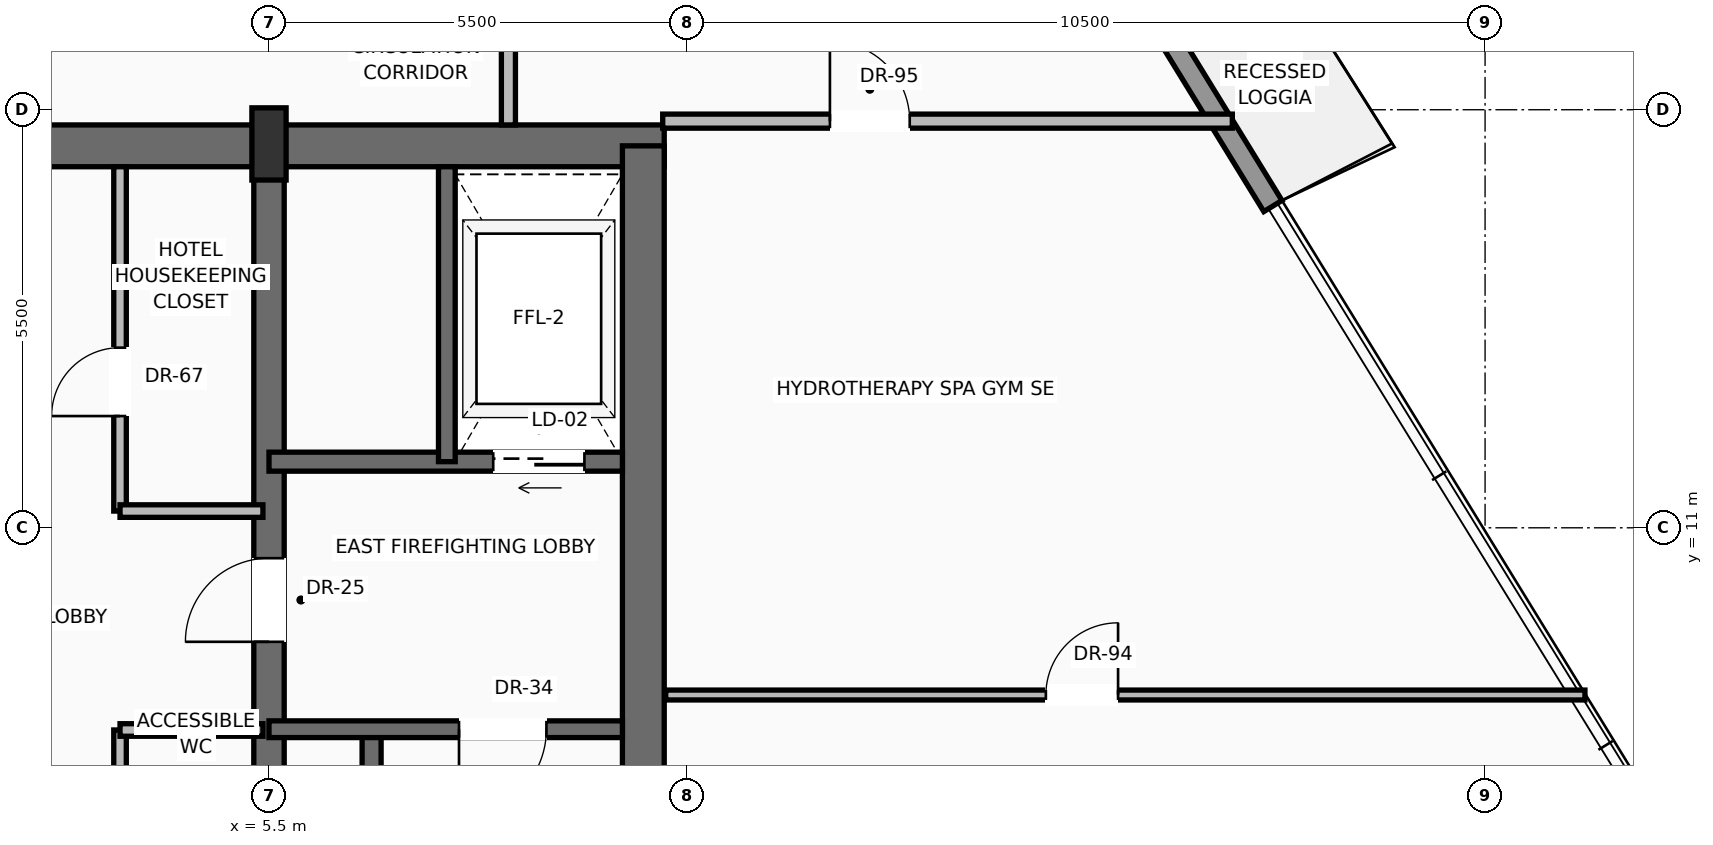
"""IFC4 building model, lengths in metres.
Left out: names, types, materials, properties, quantities, classifications, styles, units other than length and angle.
Written with IfcOpenShell. Run it as: python <this file> out.ifc"""

import sys

from ifc_helpers import new_model, si_unit, direction, frame, frame_2d, origin, origin_2d, place, context, subcontext, project, spatial, rectangle, extrude, source, transform, mapped, element, fill, save


model = new_model("IFC4")
c1 = context("Model", 3, precision=1e-05, world=origin(), true_north=direction((0.0, 1.0)))
c2 = subcontext(c1, "Body", "Model", "MODEL_VIEW")
j1 = project(units=[si_unit("LENGTHUNIT", "METRE"), si_unit("PLANEANGLEUNIT", "RADIAN")], contexts=[c1])
p1 = place(None, origin())
s1 = spatial("IfcSite", under=j1, at=p1, CompositionType="ELEMENT")
p2 = place(p1, origin())
s2 = spatial("IfcBuilding", under=s1, at=p2, CompositionType="ELEMENT")
p3 = place(p2, frame((0.0, 0.0, 244.15)))
s3 = spatial("IfcBuildingStorey", under=s2, at=p3, CompositionType="ELEMENT", Elevation=244.15)
p4 = place(p3, frame((-10.7, 16.025, 0.0), z_axis=(0.0, 0.0, 1.0), x_axis=(1.0, 0.0, 0.0)))
e1 = element("IfcWall", 1, at=p4, inside=s3, PredefinedType="SHEAR", context=c2, shape_type="SweptSolid", body=[
    extrude(rectangle(XDim=21.4, YDim=0.55, at=frame_2d((10.7, 0.0))), origin(), (0.0, 0.0, 1.0), 3.24),
])
p5 = place(p4, frame((3.27, 0.0, 0.0)))
e2 = element("IfcOpeningElement", 2, at=p5, cuts=e1, PredefinedType="OPENING", context=c2, shape_type="SweptSolid", body=[
    extrude(rectangle(XDim=1.3, YDim=2.3, at=frame_2d((0.65, 1.15))), frame((0.0, 0.285, 0.0), z_axis=(0.0, -1.0, 0.0), x_axis=(1.0, 0.0, 0.0)), (0.0, 0.0, 1.0), 0.57),
])
p6 = place(p4, frame((9.7, 0.0, 0.0)))
e3 = element("IfcOpeningElement", 3, at=p6, cuts=e1, PredefinedType="OPENING", context=c2, shape_type="SweptSolid", body=[
    extrude(rectangle(XDim=2.0, YDim=2.4, at=frame_2d((1.0, 1.2))), frame((0.0, 0.285, 0.0), z_axis=(0.0, -1.0, 0.0), x_axis=(1.0, 0.0, 0.0)), (0.0, 0.0, 1.0), 0.57),
])
p7 = place(p3, frame((10.425, 0.575, 0.0), z_axis=(0.0, 0.0, 1.0), x_axis=(0.0, 1.0, 0.0)))
e4 = element("IfcWall", 4, at=p7, inside=s3, PredefinedType="SHEAR", context=c2, shape_type="SweptSolid", body=[
    extrude(rectangle(XDim=15.45, YDim=0.55, at=frame_2d((7.725, 0.0))), origin(), (0.0, 0.0, 1.0), 3.24),
])
p8 = place(p3, frame((5.5, 0.575, 0.0), z_axis=(0.0, 0.0, 1.0), x_axis=(0.0, 1.0, 0.0)))
e5 = element("IfcWall", 5, at=p8, inside=s3, PredefinedType="SHEAR", context=c2, shape_type="SweptSolid", body=[
    extrude(rectangle(XDim=15.45, YDim=0.4, at=frame_2d((7.725, 0.0))), origin(), (0.0, 0.0, 1.0), 3.24),
])
p9 = place(p8, frame((8.925, 0.0, 0.0)))
e6 = element("IfcOpeningElement", 6, at=p9, cuts=e5, PredefinedType="OPENING", context=c2, shape_type="SweptSolid", body=[
    extrude(rectangle(XDim=1.1, YDim=2.2, at=frame_2d((0.55, 1.1))), frame((0.0, 0.21, 0.0), z_axis=(0.0, -1.0, 0.0), x_axis=(1.0, 0.0, 0.0)), (0.0, 0.0, 1.0), 0.42),
])
m1 = source(origin(), c2, "Body", "SweptSolid", [
    extrude(rectangle(XDim=0.45, YDim=0.95, at=origin_2d()), origin(), (0.0, 0.0, 1.0), 3.45),
])
p10 = place(p3, frame((5.5, 16.05, 0.0), z_axis=(0.0, 0.0, 1.0), x_axis=(1.0, 0.0, 0.0)))
e7 = element("IfcColumn", 7, at=p10, inside=s3, PredefinedType="PILASTER", context=c2, shape_type="MappedRepresentation", body=[
    mapped(m1, transform((0.0, 0.0, 0.0), scale=1.0)),
])
p11 = place(p3, frame((8.394, 32.017, 0.0), z_axis=(0.0, 0.0, 1.0), x_axis=(0.523559364354, -0.851989197113, 0.0)))
e8 = element("IfcWall", 8, at=p11, inside=s3, PredefinedType="SOLIDWALL", context=c2, shape_type="SweptSolid", body=[
    extrude(rectangle(XDim=19.7, YDim=0.28, at=frame_2d((9.85, 0.0))), origin(), (0.0, 0.0, 1.0), 2.82),
])
p12 = place(p11, frame((4.728, 0.0, 0.0)))
e9 = element("IfcOpeningElement", 9, at=p12, cuts=e8, PredefinedType="OPENING", context=c2, shape_type="SweptSolid", body=[
    extrude(rectangle(XDim=1.6, YDim=2.35, at=frame_2d((0.8, 1.175))), frame((0.0, 0.15, 0.0), z_axis=(0.0, -1.0, 0.0), x_axis=(1.0, 0.0, 0.0)), (0.0, 0.0, 1.0), 0.3),
])
p13 = place(p11, frame((13.396, 0.0, 0.9)))
e10 = element("IfcOpeningElement", 10, at=p13, cuts=e8, PredefinedType="OPENING", context=c2, shape_type="SweptSolid", body=[
    extrude(rectangle(XDim=1.55, YDim=1.75, at=frame_2d((0.775, 0.875))), frame((0.0, 0.15, 0.0), z_axis=(0.0, -1.0, 0.0), x_axis=(1.0, 0.0, 0.0)), (0.0, 0.0, 1.0), 0.3),
])
p14 = place(p3, frame((6.85, 0.85, 0.0), z_axis=(0.0, 0.0, 1.0), x_axis=(0.0, 1.0, 0.0)))
e11 = element("IfcWall", 11, at=p14, inside=s3, PredefinedType="SOLIDWALL", context=c2, shape_type="SweptSolid", body=[
    extrude(rectangle(XDim=7.5, YDim=0.25, at=frame_2d((3.75, 0.0))), origin(), (0.0, 0.0, 1.0), 3.24),
])
p15 = place(p3, frame((10.15, 8.35, 0.0), z_axis=(0.0, 0.0, 1.0), x_axis=(-1.0, 0.0, 0.0)))
e12 = element("IfcWall", 12, at=p15, inside=s3, PredefinedType="SOLIDWALL", context=c2, shape_type="SweptSolid", body=[
    extrude(rectangle(XDim=4.65, YDim=0.22, at=frame_2d((2.325, 0.0))), origin(), (0.0, 0.0, 1.0), 3.24),
])
p16 = place(p15, frame((1.0, 0.0, 0.0)))
e13 = element("IfcOpeningElement", 13, at=p16, cuts=e12, PredefinedType="OPENING", context=c2, shape_type="SweptSolid", body=[
    extrude(rectangle(XDim=1.15, YDim=2.2, at=frame_2d((0.575, 1.1))), frame((0.0, 0.12, 0.0), z_axis=(0.0, -1.0, 0.0), x_axis=(1.0, 0.0, 0.0)), (0.0, 0.0, 1.0), 0.24),
])
p17 = place(p3, frame((10.15, 11.87, 0.0), z_axis=(0.0, 0.0, 1.0), x_axis=(-1.0, 0.0, 0.0)))
e14 = element("IfcWall", 14, at=p17, inside=s3, PredefinedType="SOLIDWALL", context=c2, shape_type="SweptSolid", body=[
    extrude(rectangle(XDim=4.65, YDim=0.25, at=frame_2d((2.325, 0.0))), origin(), (0.0, 0.0, 1.0), 3.24),
])
p18 = place(p17, frame((0.5, 0.0, 0.0)))
e15 = element("IfcOpeningElement", 15, at=p18, cuts=e14, PredefinedType="OPENING", context=c2, shape_type="SweptSolid", body=[
    extrude(rectangle(XDim=1.2, YDim=2.25, at=frame_2d((0.6, 1.125))), frame((0.0, 0.135, 0.0), z_axis=(0.0, -1.0, 0.0), x_axis=(1.0, 0.0, 0.0)), (0.0, 0.0, 1.0), 0.27),
])
p19 = place(p3, frame((7.84, 11.87, 0.0), z_axis=(0.0, 0.0, 1.0), x_axis=(0.0, 1.0, 0.0)))
e16 = element("IfcWall", 16, at=p19, inside=s3, PredefinedType="SOLIDWALL", context=c2, shape_type="SweptSolid", body=[
    extrude(rectangle(XDim=3.88, YDim=0.22, at=frame_2d((1.94, 0.0))), origin(), (0.0, 0.0, 1.0), 3.24),
])
p20 = place(p3, frame((3.54, 6.0, 0.0), z_axis=(0.0, 0.0, 1.0), x_axis=(0.0, 1.0, 0.0)))
e17 = element("IfcWall", 17, at=p20, inside=s3, PredefinedType="PARTITIONING", context=c2, shape_type="SweptSolid", body=[
    extrude(rectangle(XDim=2.34, YDim=0.165, at=frame_2d((1.17, 0.0))), origin(), (0.0, 0.0, 1.0), 3.232),
])
p21 = place(p20, frame((0.72, 0.0, 0.0)))
e18 = element("IfcOpeningElement", 18, at=p21, cuts=e17, PredefinedType="OPENING", context=c2, shape_type="SweptSolid", body=[
    extrude(rectangle(XDim=0.9, YDim=2.1, at=frame_2d((0.45, 1.05))), frame((0.0, 0.093, 0.0), z_axis=(0.0, -1.0, 0.0), x_axis=(1.0, 0.0, 0.0)), (0.0, 0.0, 1.0), 0.185),
])
p22 = place(p3, frame((3.54, 8.34, 0.0), z_axis=(0.0, 0.0, 1.0), x_axis=(1.0, 0.0, 0.0)))
e19 = element("IfcWall", 19, at=p22, inside=s3, PredefinedType="PARTITIONING", context=c2, shape_type="SweptSolid", body=[
    extrude(rectangle(XDim=1.88, YDim=0.165, at=frame_2d((0.94, 0.0))), origin(), (0.0, 0.0, 1.0), 3.232),
])
p23 = place(p3, frame((3.54, 11.22, 0.0), z_axis=(0.0, 0.0, 1.0), x_axis=(0.0, 1.0, 0.0)))
e20 = element("IfcWall", 20, at=p23, inside=s3, PredefinedType="PARTITIONING", context=c2, shape_type="SweptSolid", body=[
    extrude(rectangle(XDim=4.53, YDim=0.165, at=frame_2d((2.265, 0.0))), origin(), (0.0, 0.0, 1.0), 3.232),
])
p24 = place(p23, frame((1.25, 0.0, 0.0)))
e21 = element("IfcOpeningElement", 21, at=p24, cuts=e20, PredefinedType="OPENING", context=c2, shape_type="SweptSolid", body=[
    extrude(rectangle(XDim=0.9, YDim=2.1, at=frame_2d((0.45, 1.05))), frame((0.0, 0.093, 0.0), z_axis=(0.0, -1.0, 0.0), x_axis=(1.0, 0.0, 0.0)), (0.0, 0.0, 1.0), 0.185),
])
p25 = place(p3, frame((3.54, 11.22, 0.0), z_axis=(0.0, 0.0, 1.0), x_axis=(1.0, 0.0, 0.0)))
e22 = element("IfcWall", 22, at=p25, inside=s3, PredefinedType="PARTITIONING", context=c2, shape_type="SweptSolid", body=[
    extrude(rectangle(XDim=1.88, YDim=0.165, at=frame_2d((0.94, 0.0))), origin(), (0.0, 0.0, 1.0), 3.232),
])
p26 = place(p3, frame((8.65, 16.3, 0.0), z_axis=(0.0, 0.0, 1.0), x_axis=(0.0, 1.0, 0.0)))
e23 = element("IfcWall", 23, at=p26, inside=s3, PredefinedType="PARTITIONING", context=c2, shape_type="SweptSolid", body=[
    extrude(rectangle(XDim=13.9, YDim=0.185, at=frame_2d((6.95, 0.0))), origin(), (0.0, 0.0, 1.0), 3.232),
])
p27 = place(p26, frame((3.144, 0.0, 0.0)))
e24 = element("IfcOpeningElement", 24, at=p27, cuts=e23, PredefinedType="OPENING", context=c2, shape_type="SweptSolid", body=[
    extrude(rectangle(XDim=1.05, YDim=2.25, at=frame_2d((0.525, 1.125))), frame((0.0, 0.103, 0.0), z_axis=(0.0, -1.0, 0.0), x_axis=(1.0, 0.0, 0.0)), (0.0, 0.0, 1.0), 0.205),
])
p28 = place(p3, frame((10.68, 16.35, 0.0), z_axis=(0.0, 0.0, 1.0), x_axis=(1.0, 0.0, 0.0)))
e25 = element("IfcWall", 25, at=p28, inside=s3, PredefinedType="PARTITIONING", context=c2, shape_type="SweptSolid", body=[
    extrude(rectangle(XDim=7.495, YDim=0.185, at=frame_2d((3.747, 0.0))), origin(), (0.0, 0.0, 1.0), 3.232),
])
p29 = place(p28, frame((2.2, 0.0, 0.0)))
e26 = element("IfcOpeningElement", 26, at=p29, cuts=e25, PredefinedType="OPENING", context=c2, shape_type="SweptSolid", body=[
    extrude(rectangle(XDim=1.05, YDim=2.25, at=frame_2d((0.525, 1.125))), frame((0.0, 0.103, 0.0), z_axis=(0.0, -1.0, 0.0), x_axis=(1.0, 0.0, 0.0)), (0.0, 0.0, 1.0), 0.205),
])
p30 = place(p3, frame((10.72, 8.8, 0.0), z_axis=(0.0, 0.0, 1.0), x_axis=(1.0, 0.0, 0.0)))
e27 = element("IfcWall", 27, at=p30, inside=s3, PredefinedType="PARTITIONING", context=c2, shape_type="SweptSolid", body=[
    extrude(rectangle(XDim=12.094, YDim=0.13, at=frame_2d((6.047, 0.0))), origin(), (0.0, 0.0, 1.0), 3.232),
])
p31 = place(p30, frame((5.001, 0.0, 0.0)))
e28 = element("IfcOpeningElement", 28, at=p31, cuts=e27, PredefinedType="OPENING", context=c2, shape_type="SweptSolid", body=[
    extrude(rectangle(XDim=0.95, YDim=2.2, at=frame_2d((0.475, 1.1))), frame((0.0, 0.075, 0.0), z_axis=(0.0, -1.0, 0.0), x_axis=(1.0, 0.0, 0.0)), (0.0, 0.0, 1.0), 0.15),
])
m2 = source(origin(), c2, "Body", "SweptSolid", [
    extrude(rectangle(XDim=1.15, YDim=2.2, at=frame_2d((0.575, 1.1))), frame((0.0, 0.025, 0.0), z_axis=(0.0, -1.0, 0.0), x_axis=(1.0, 0.0, 0.0)), (0.0, 0.0, 1.0), 0.05),
])
p32 = place(p16, origin())
e29 = element("IfcDoor", 29, at=p32, inside=s3, OperationType="SINGLE_SWING_RIGHT", PredefinedType="DOOR", context=c2, shape_type="MappedRepresentation", body=[
    mapped(m2, transform((0.0, 0.0, 0.0), scale=1.0)),
])
fill(e13, e29)
m3 = source(origin(), c2, "Body", "SweptSolid", [
    extrude(rectangle(XDim=1.1, YDim=2.2, at=frame_2d((0.55, 1.1))), frame((0.0, 0.025, 0.0), z_axis=(0.0, -1.0, 0.0), x_axis=(1.0, 0.0, 0.0)), (0.0, 0.0, 1.0), 0.05),
])
p33 = place(p9, origin())
e30 = element("IfcDoor", 30, at=p33, inside=s3, OperationType="SINGLE_SWING_LEFT", PredefinedType="DOOR", context=c2, shape_type="MappedRepresentation", body=[
    mapped(m3, transform((0.0, 0.0, 0.0), scale=1.0)),
])
fill(e6, e30)
m4 = source(origin(), c2, "Body", "SweptSolid", [
    extrude(rectangle(XDim=1.2, YDim=2.25, at=frame_2d((0.6, 1.125))), frame((0.0, 0.025, 0.0), z_axis=(0.0, -1.0, 0.0), x_axis=(1.0, 0.0, 0.0)), (0.0, 0.0, 1.0), 0.05),
])
p34 = place(p18, origin())
e31 = element("IfcDoor", 31, at=p34, inside=s3, OperationType="SLIDING_TO_RIGHT", PredefinedType="DOOR", context=c2, shape_type="MappedRepresentation", body=[
    mapped(m4, transform((0.0, 0.0, 0.0), scale=1.0)),
])
fill(e15, e31)
m5 = source(origin(), c2, "Body", "SweptSolid", [
    extrude(rectangle(XDim=0.9, YDim=2.1, at=frame_2d((0.45, 1.05))), frame((0.0, 0.025, 0.0), z_axis=(0.0, -1.0, 0.0), x_axis=(1.0, 0.0, 0.0)), (0.0, 0.0, 1.0), 0.05),
])
p35 = place(p24, origin())
e32 = element("IfcDoor", 32, at=p35, inside=s3, OperationType="SINGLE_SWING_LEFT", PredefinedType="DOOR", context=c2, shape_type="MappedRepresentation", body=[
    mapped(m5, transform((0.0, 0.0, 0.0), scale=1.0)),
])
fill(e21, e32)
m6 = source(origin(), c2, "Body", "SweptSolid", [
    extrude(rectangle(XDim=1.05, YDim=2.25, at=frame_2d((0.525, 1.125))), frame((0.0, 0.025, 0.0), z_axis=(0.0, -1.0, 0.0), x_axis=(1.0, 0.0, 0.0)), (0.0, 0.0, 1.0), 0.05),
])
p36 = place(p29, origin())
e33 = element("IfcDoor", 33, at=p36, inside=s3, OperationType="SINGLE_SWING_LEFT", PredefinedType="DOOR", context=c2, shape_type="MappedRepresentation", body=[
    mapped(m6, transform((0.0, 0.0, 0.0), scale=1.0)),
])
fill(e26, e33)
m7 = source(origin(), c2, "Body", "SweptSolid", [
    extrude(rectangle(XDim=0.95, YDim=2.2, at=frame_2d((0.475, 1.1))), frame((0.0, 0.025, 0.0), z_axis=(0.0, -1.0, 0.0), x_axis=(1.0, 0.0, 0.0)), (0.0, 0.0, 1.0), 0.05),
])
p37 = place(p31, origin())
e34 = element("IfcDoor", 34, at=p37, inside=s3, OperationType="SINGLE_SWING_RIGHT", PredefinedType="DOOR", context=c2, shape_type="MappedRepresentation", body=[
    mapped(m7, transform((0.0, 0.0, 0.0), scale=1.0)),
])
fill(e28, e34)
save(model, sys.argv[1])
